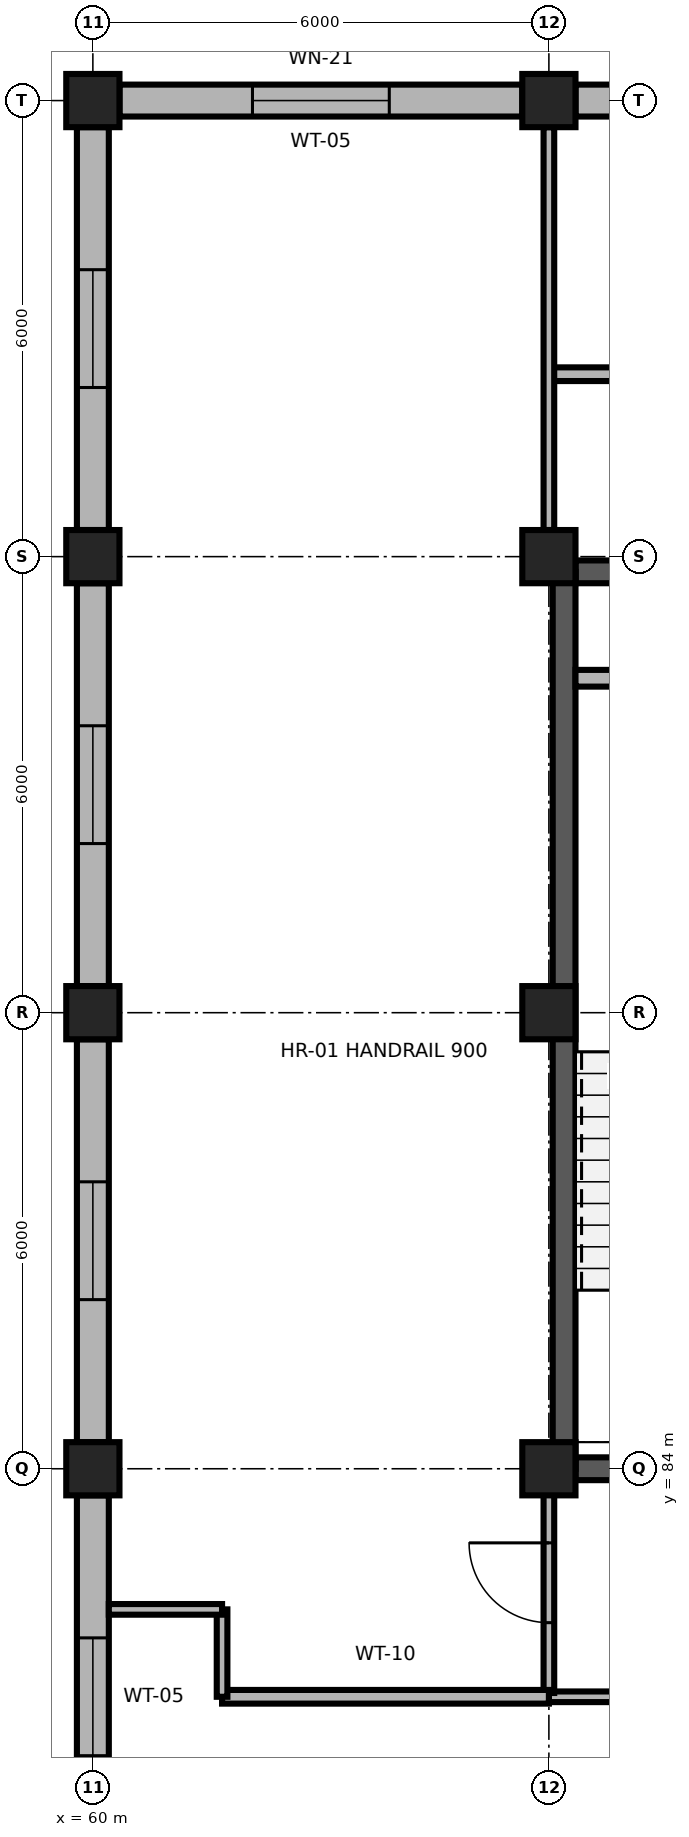
"""IFC4 building model, lengths in metres.
Left out: names, types, materials, properties, quantities, classifications, styles, units other than length and angle.
Written with IfcOpenShell. Run it as: python <this file> out.ifc"""

import sys

from ifc_helpers import new_model, si_unit, direction, frame, frame_2d, origin, origin_2d, place, context, subcontext, project, spatial, rectangle, extrude, element, fill, save


model = new_model("IFC4")
c1 = context("Model", 3, precision=1e-05, world=origin(), true_north=direction((0.0, 1.0)))
c2 = subcontext(c1, "Body", "Model", "MODEL_VIEW")
j1 = project(units=[si_unit("LENGTHUNIT", "METRE"), si_unit("PLANEANGLEUNIT", "RADIAN")], contexts=[c1])
p1 = place(None, origin())
s1 = spatial("IfcSite", under=j1, at=p1, CompositionType="ELEMENT")
p2 = place(p1, origin())
s2 = spatial("IfcBuilding", under=s1, at=p2, CompositionType="ELEMENT")
p3 = place(p2, frame((0.0, 0.0, 52.2)))
s3 = spatial("IfcBuildingStorey", under=s2, at=p3, CompositionType="ELEMENT", Elevation=52.2)
for number, where, z_axis, x_axis in (
    (1, (60.0, 84.0, 0.0), (0.0, 0.0, 1.0), (1.0, 0.0, 0.0)),
    (2, (66.0, 84.0, 0.0), (0.0, 0.0, 1.0), (1.0, 0.0, 0.0)),
    (3, (60.0, 90.0, 0.0), (0.0, 0.0, 1.0), (1.0, 0.0, 0.0)),
    (4, (66.0, 90.0, 0.0), (0.0, 0.0, 1.0), (1.0, 0.0, 0.0)),
    (5, (60.0, 96.0, 0.0), (0.0, 0.0, 1.0), (1.0, 0.0, 0.0)),
    (6, (66.0, 96.0, 0.0), (0.0, 0.0, 1.0), (1.0, 0.0, 0.0)),
    (7, (60.0, 102.0, 0.0), (0.0, 0.0, 1.0), (1.0, 0.0, 0.0)),
    (8, (66.0, 102.0, 0.0), (0.0, 0.0, 1.0), (1.0, 0.0, 0.0)),
):
    element("IfcColumn", number, at=place(p3, frame(where, z_axis=z_axis, x_axis=x_axis)), inside=s3, PredefinedType="COLUMN", context=c2, shape_type="SweptSolid", body=[
        extrude(rectangle(XDim=0.7, YDim=0.7, at=origin_2d()), origin(), (0.0, 0.0, 1.0), 3.9),
    ])
p4 = place(p3, frame((60.35, 102.0, 0.0), z_axis=(0.0, 0.0, 1.0), x_axis=(1.0, 0.0, 0.0)))
e9 = element("IfcWall", 9, at=p4, inside=s3, PredefinedType="SOLIDWALL", context=c2, shape_type="SweptSolid", body=[
    extrude(rectangle(XDim=5.3, YDim=0.42, at=frame_2d((2.65, 0.0))), origin(), (0.0, 0.0, 1.0), 3.32),
])
p5 = place(p4, frame((1.75, 0.0, 0.85)))
e10 = element("IfcOpeningElement", 10, at=p5, cuts=e9, PredefinedType="OPENING", context=c2, shape_type="SweptSolid", body=[
    extrude(rectangle(XDim=1.8, YDim=1.95, at=frame_2d((0.9, 0.975))), frame((0.0, 0.225, 0.0), z_axis=(0.0, -1.0, 0.0), x_axis=(1.0, 0.0, 0.0)), (0.0, 0.0, 1.0), 0.45),
])
p6 = place(p3, frame((66.35, 102.0, 0.0), z_axis=(0.0, 0.0, 1.0), x_axis=(1.0, 0.0, 0.0)))
e11 = element("IfcWall", 11, at=p6, inside=s3, PredefinedType="SOLIDWALL", context=c2, shape_type="SweptSolid", body=[
    extrude(rectangle(XDim=5.3, YDim=0.42, at=frame_2d((2.65, 0.0))), origin(), (0.0, 0.0, 1.0), 3.32),
])
p7 = place(p6, frame((1.75, 0.0, 0.85)))
e12 = element("IfcOpeningElement", 12, at=p7, cuts=e11, PredefinedType="OPENING", context=c2, shape_type="SweptSolid", body=[
    extrude(rectangle(XDim=1.8, YDim=1.95, at=frame_2d((0.9, 0.975))), frame((0.0, 0.225, 0.0), z_axis=(0.0, -1.0, 0.0), x_axis=(1.0, 0.0, 0.0)), (0.0, 0.0, 1.0), 0.45),
])
p8 = place(p3, frame((60.0, 78.35, 0.0), z_axis=(0.0, 0.0, 1.0), x_axis=(0.0, 1.0, 0.0)))
e13 = element("IfcWall", 13, at=p8, inside=s3, PredefinedType="SOLIDWALL", context=c2, shape_type="SweptSolid", body=[
    extrude(rectangle(XDim=5.3, YDim=0.42, at=frame_2d((2.65, 0.0))), origin(), (0.0, 0.0, 1.0), 3.32),
])
p9 = place(p8, frame((1.875, 0.0, 0.85)))
e14 = element("IfcOpeningElement", 14, at=p9, cuts=e13, PredefinedType="OPENING", context=c2, shape_type="SweptSolid", body=[
    extrude(rectangle(XDim=1.55, YDim=1.9, at=frame_2d((0.775, 0.95))), frame((0.0, 0.225, 0.0), z_axis=(0.0, -1.0, 0.0), x_axis=(1.0, 0.0, 0.0)), (0.0, 0.0, 1.0), 0.45),
])
p10 = place(p3, frame((60.0, 84.35, 0.0), z_axis=(0.0, 0.0, 1.0), x_axis=(0.0, 1.0, 0.0)))
e15 = element("IfcWall", 15, at=p10, inside=s3, PredefinedType="SOLIDWALL", context=c2, shape_type="SweptSolid", body=[
    extrude(rectangle(XDim=5.3, YDim=0.42, at=frame_2d((2.65, 0.0))), origin(), (0.0, 0.0, 1.0), 3.32),
])
p11 = place(p10, frame((1.875, 0.0, 0.85)))
e16 = element("IfcOpeningElement", 16, at=p11, cuts=e15, PredefinedType="OPENING", context=c2, shape_type="SweptSolid", body=[
    extrude(rectangle(XDim=1.55, YDim=1.9, at=frame_2d((0.775, 0.95))), frame((0.0, 0.225, 0.0), z_axis=(0.0, -1.0, 0.0), x_axis=(1.0, 0.0, 0.0)), (0.0, 0.0, 1.0), 0.45),
])
p12 = place(p3, frame((60.0, 90.35, 0.0), z_axis=(0.0, 0.0, 1.0), x_axis=(0.0, 1.0, 0.0)))
e17 = element("IfcWall", 17, at=p12, inside=s3, PredefinedType="SOLIDWALL", context=c2, shape_type="SweptSolid", body=[
    extrude(rectangle(XDim=5.3, YDim=0.42, at=frame_2d((2.65, 0.0))), origin(), (0.0, 0.0, 1.0), 3.32),
])
p13 = place(p12, frame((1.875, 0.0, 0.85)))
e18 = element("IfcOpeningElement", 18, at=p13, cuts=e17, PredefinedType="OPENING", context=c2, shape_type="SweptSolid", body=[
    extrude(rectangle(XDim=1.55, YDim=1.9, at=frame_2d((0.775, 0.95))), frame((0.0, 0.225, 0.0), z_axis=(0.0, -1.0, 0.0), x_axis=(1.0, 0.0, 0.0)), (0.0, 0.0, 1.0), 0.45),
])
p14 = place(p3, frame((60.0, 96.35, 0.0), z_axis=(0.0, 0.0, 1.0), x_axis=(0.0, 1.0, 0.0)))
e19 = element("IfcWall", 19, at=p14, inside=s3, PredefinedType="SOLIDWALL", context=c2, shape_type="SweptSolid", body=[
    extrude(rectangle(XDim=5.3, YDim=0.42, at=frame_2d((2.65, 0.0))), origin(), (0.0, 0.0, 1.0), 3.32),
])
p15 = place(p14, frame((1.875, 0.0, 0.85)))
e20 = element("IfcOpeningElement", 20, at=p15, cuts=e19, PredefinedType="OPENING", context=c2, shape_type="SweptSolid", body=[
    extrude(rectangle(XDim=1.55, YDim=1.9, at=frame_2d((0.775, 0.95))), frame((0.0, 0.225, 0.0), z_axis=(0.0, -1.0, 0.0), x_axis=(1.0, 0.0, 0.0)), (0.0, 0.0, 1.0), 0.45),
])
p16 = place(p3, frame((66.35, 84.0, 0.0), z_axis=(0.0, 0.0, 1.0), x_axis=(1.0, 0.0, 0.0)))
e21 = element("IfcWall", 21, at=p16, inside=s3, PredefinedType="SHEAR", context=c2, shape_type="SweptSolid", body=[
    extrude(rectangle(XDim=5.3, YDim=0.3, at=frame_2d((2.65, 0.0))), origin(), (0.0, 0.0, 1.0), 3.66),
])
p17 = place(p16, frame((1.975, 0.0, 0.0)))
e22 = element("IfcOpeningElement", 22, at=p17, cuts=e21, PredefinedType="OPENING", context=c2, shape_type="SweptSolid", body=[
    extrude(rectangle(XDim=1.35, YDim=2.2, at=frame_2d((0.675, 1.1))), frame((0.0, 0.165, 0.0), z_axis=(0.0, -1.0, 0.0), x_axis=(1.0, 0.0, 0.0)), (0.0, 0.0, 1.0), 0.33),
])
p18 = place(p3, frame((66.35, 95.8, 0.0), z_axis=(0.0, 0.0, 1.0), x_axis=(1.0, 0.0, 0.0)))
e23 = element("IfcWall", 23, at=p18, inside=s3, PredefinedType="SHEAR", context=c2, shape_type="SweptSolid", body=[
    extrude(rectangle(XDim=5.3, YDim=0.3, at=frame_2d((2.65, 0.0))), origin(), (0.0, 0.0, 1.0), 3.74),
])
p19 = place(p3, frame((66.2, 84.0, 0.0), z_axis=(0.0, 0.0, 1.0), x_axis=(0.0, 1.0, 0.0)))
e24 = element("IfcWall", 24, at=p19, inside=s3, PredefinedType="SHEAR", context=c2, shape_type="SweptSolid", body=[
    extrude(rectangle(XDim=11.8, YDim=0.3, at=frame_2d((5.9, 0.0))), origin(), (0.0, 0.0, 1.0), 3.74),
])
p20 = place(p3, frame((66.35, 94.4, 0.0), z_axis=(0.0, 0.0, 1.0), x_axis=(1.0, 0.0, 0.0)))
e25 = element("IfcWall", 25, at=p20, inside=s3, PredefinedType="PARTITIONING", context=c2, shape_type="SweptSolid", body=[
    extrude(rectangle(XDim=1.1, YDim=0.22, at=frame_2d((0.55, 0.0))), origin(), (0.0, 0.0, 1.0), 3.74),
])
p21 = place(p3, frame((66.0, 81.0, 0.0), z_axis=(0.0, 0.0, 1.0), x_axis=(1.0, 0.0, 0.0)))
e26 = element("IfcWall", 26, at=p21, inside=s3, PredefinedType="PARTITIONING", context=c2, shape_type="SweptSolid", body=[
    extrude(rectangle(XDim=6.0, YDim=0.14, at=frame_2d((3.0, 0.0))), origin(), (0.0, 0.0, 1.0), 3.74),
])
p22 = place(p21, frame((2.15, 0.0, 0.0)))
e27 = element("IfcOpeningElement", 27, at=p22, cuts=e26, PredefinedType="OPENING", context=c2, shape_type="SweptSolid", body=[
    extrude(rectangle(XDim=1.7, YDim=2.45, at=frame_2d((0.85, 1.225))), frame((0.0, 0.085, 0.0), z_axis=(0.0, -1.0, 0.0), x_axis=(1.0, 0.0, 0.0)), (0.0, 0.0, 1.0), 0.17),
])
p23 = place(p3, frame((66.0, 81.05, 0.0), z_axis=(0.0, 0.0, 1.0), x_axis=(0.0, 1.0, 0.0)))
e28 = element("IfcWall", 28, at=p23, inside=s3, PredefinedType="PARTITIONING", context=c2, shape_type="SweptSolid", body=[
    extrude(rectangle(XDim=2.9, YDim=0.14, at=frame_2d((1.45, 0.0))), origin(), (0.0, 0.0, 1.0), 3.449),
])
p24 = place(p23, frame((0.925, 0.0, 0.0)))
e29 = element("IfcOpeningElement", 29, at=p24, cuts=e28, PredefinedType="OPENING", context=c2, shape_type="SweptSolid", body=[
    extrude(rectangle(XDim=1.05, YDim=2.25, at=frame_2d((0.525, 1.125))), frame((0.0, 0.085, 0.0), z_axis=(0.0, -1.0, 0.0), x_axis=(1.0, 0.0, 0.0)), (0.0, 0.0, 1.0), 0.17),
])
p25 = place(p3, frame((61.7, 81.0, 0.0), z_axis=(0.0, 0.0, 1.0), x_axis=(1.0, 0.0, 0.0)))
e30 = element("IfcWall", 30, at=p25, inside=s3, PredefinedType="PARTITIONING", context=c2, shape_type="SweptSolid", body=[
    extrude(rectangle(XDim=4.3, YDim=0.18, at=frame_2d((2.15, 0.0))), origin(), (0.0, 0.0, 1.0), 3.74),
])
p26 = place(p3, frame((61.7, 81.0, 0.0), z_axis=(0.0, 0.0, 1.0), x_axis=(0.0, 1.0, 0.0)))
e31 = element("IfcWall", 31, at=p26, inside=s3, PredefinedType="PARTITIONING", context=c2, shape_type="SweptSolid", body=[
    extrude(rectangle(XDim=1.15, YDim=0.14, at=frame_2d((0.575, 0.0))), origin(), (0.0, 0.0, 1.0), 3.74),
])
p27 = place(p3, frame((61.7, 82.15, 0.0), z_axis=(0.0, 0.0, 1.0), x_axis=(-1.0, 0.0, 0.0)))
e32 = element("IfcWall", 32, at=p27, inside=s3, PredefinedType="PARTITIONING", context=c2, shape_type="SweptSolid", body=[
    extrude(rectangle(XDim=1.49, YDim=0.14, at=frame_2d((0.745, 0.0))), origin(), (0.0, 0.0, 1.0), 3.74),
])
p28 = place(p3, frame((66.0, 98.4, 0.0), z_axis=(0.0, 0.0, 1.0), x_axis=(1.0, 0.0, 0.0)))
e33 = element("IfcWall", 33, at=p28, inside=s3, PredefinedType="PARTITIONING", context=c2, shape_type="SweptSolid", body=[
    extrude(rectangle(XDim=6.0, YDim=0.18, at=frame_2d((3.0, 0.0))), origin(), (0.0, 0.0, 1.0), 3.74),
])
p29 = place(p3, frame((66.0, 96.35, 0.0), z_axis=(0.0, 0.0, 1.0), x_axis=(0.0, 1.0, 0.0)))
e34 = element("IfcWall", 34, at=p29, inside=s3, PredefinedType="PARTITIONING", context=c2, shape_type="SweptSolid", body=[
    extrude(rectangle(XDim=5.3, YDim=0.14, at=frame_2d((2.65, 0.0))), origin(), (0.0, 0.0, 1.0), 3.449),
])
p30 = place(p5, origin())
e35 = element("IfcWindow", 35, at=p30, inside=s3, PartitioningType="SINGLE_PANEL", PredefinedType="WINDOW", context=c2, shape_type="SweptSolid", body=[
    extrude(rectangle(XDim=1.8, YDim=1.95, at=frame_2d((0.9, 0.975))), frame((0.0, 0.03, 0.0), z_axis=(0.0, -1.0, 0.0), x_axis=(1.0, 0.0, 0.0)), (0.0, 0.0, 1.0), 0.06),
])
fill(e10, e35)
p31 = place(p9, origin())
e36 = element("IfcWindow", 36, at=p31, inside=s3, PartitioningType="SINGLE_PANEL", PredefinedType="WINDOW", context=c2, shape_type="SweptSolid", body=[
    extrude(rectangle(XDim=1.55, YDim=1.9, at=frame_2d((0.775, 0.95))), frame((0.0, 0.03, 0.0), z_axis=(0.0, -1.0, 0.0), x_axis=(1.0, 0.0, 0.0)), (0.0, 0.0, 1.0), 0.06),
])
fill(e14, e36)
p32 = place(p11, origin())
e37 = element("IfcWindow", 37, at=p32, inside=s3, PartitioningType="SINGLE_PANEL", PredefinedType="WINDOW", context=c2, shape_type="SweptSolid", body=[
    extrude(rectangle(XDim=1.55, YDim=1.9, at=frame_2d((0.775, 0.95))), frame((0.0, 0.03, 0.0), z_axis=(0.0, -1.0, 0.0), x_axis=(1.0, 0.0, 0.0)), (0.0, 0.0, 1.0), 0.06),
])
fill(e16, e37)
p33 = place(p13, origin())
e38 = element("IfcWindow", 38, at=p33, inside=s3, PartitioningType="SINGLE_PANEL", PredefinedType="WINDOW", context=c2, shape_type="SweptSolid", body=[
    extrude(rectangle(XDim=1.55, YDim=1.9, at=frame_2d((0.775, 0.95))), frame((0.0, 0.03, 0.0), z_axis=(0.0, -1.0, 0.0), x_axis=(1.0, 0.0, 0.0)), (0.0, 0.0, 1.0), 0.06),
])
fill(e18, e38)
p34 = place(p15, origin())
e39 = element("IfcWindow", 39, at=p34, inside=s3, PartitioningType="SINGLE_PANEL", PredefinedType="WINDOW", context=c2, shape_type="SweptSolid", body=[
    extrude(rectangle(XDim=1.55, YDim=1.9, at=frame_2d((0.775, 0.95))), frame((0.0, 0.03, 0.0), z_axis=(0.0, -1.0, 0.0), x_axis=(1.0, 0.0, 0.0)), (0.0, 0.0, 1.0), 0.06),
])
fill(e20, e39)
p35 = place(p24, origin())
e40 = element("IfcDoor", 40, at=p35, inside=s3, OperationType="SINGLE_SWING_RIGHT", PredefinedType="DOOR", context=c2, shape_type="SweptSolid", body=[
    extrude(rectangle(XDim=1.05, YDim=2.25, at=frame_2d((0.525, 1.125))), frame((0.0, 0.025, 0.0), z_axis=(0.0, -1.0, 0.0), x_axis=(1.0, 0.0, 0.0)), (0.0, 0.0, 1.0), 0.05),
])
fill(e29, e40)
save(model, sys.argv[1])
